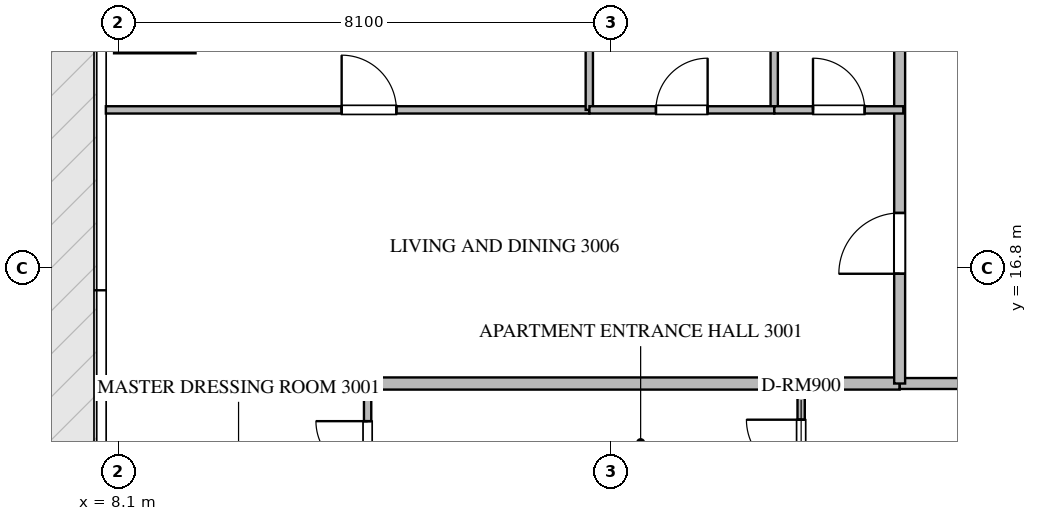
"""IFC4 building model, lengths in metres.
Left out: names, types, materials, properties, quantities, classifications, styles, units other than length and angle.
Written with IfcOpenShell. Run it as: python <this file> out.ifc"""

import sys

from ifc_helpers import new_model, si_unit, direction, frame, frame_2d, origin, place, context, subcontext, project, spatial, rectangle, extrude, source, transform, mapped, element, fill, save


model = new_model("IFC4")
c1 = context("Model", 3, precision=1e-05, world=origin(), true_north=direction((0.0, 1.0)))
c2 = subcontext(c1, "Body", "Model", "MODEL_VIEW")
j1 = project(units=[si_unit("LENGTHUNIT", "METRE"), si_unit("PLANEANGLEUNIT", "RADIAN")], contexts=[c1])
p1 = place(None, origin())
s1 = spatial("IfcSite", under=j1, at=p1, CompositionType="ELEMENT")
p2 = place(p1, origin())
s2 = spatial("IfcBuilding", under=s1, at=p2, CompositionType="ELEMENT")
p3 = place(p2, frame((0.0, 0.0, 123.9)))
s3 = spatial("IfcBuildingStorey", under=s2, at=p3, CompositionType="ELEMENT", Elevation=123.9)
p4 = place(p3, frame((7.882, 14.9, 0.0), z_axis=(0.0, 0.0, 1.0), x_axis=(1.0, 0.0, 0.0)))
e1 = element("IfcWall", 1, at=p4, inside=s3, PredefinedType="PARTITIONING", context=c2, shape_type="SweptSolid", body=[
    extrude(rectangle(XDim=13.068, YDim=0.2, at=frame_2d((6.534, 0.0))), origin(), (0.0, 0.0, 1.0), 3.49),
])
p5 = place(p3, frame((20.952, 14.9, 0.0), z_axis=(0.0, 0.0, 1.0), x_axis=(1.0, 0.0, 0.0)))
e2 = element("IfcWall", 2, at=p5, inside=s3, PredefinedType="PARTITIONING", context=c2, shape_type="SweptSolid", body=[
    extrude(rectangle(XDim=22.896, YDim=0.18, at=frame_2d((11.448, 0.0))), origin(), (0.0, 0.0, 1.0), 3.49),
])
p6 = place(p5, frame((2.781, 0.0, 0.0)))
e3 = element("IfcOpeningElement", 3, at=p6, cuts=e2, PredefinedType="OPENING", context=c2, shape_type="SweptSolid", body=[
    extrude(rectangle(XDim=1.0, YDim=2.15, at=frame_2d((0.5, 1.075))), frame((0.0, 0.1, 0.0), z_axis=(0.0, -1.0, 0.0), x_axis=(1.0, 0.0, 0.0)), (0.0, 0.0, 1.0), 0.2),
])
p7 = place(p5, frame((7.16, 0.0, 0.0)))
e4 = element("IfcOpeningElement", 4, at=p7, cuts=e2, PredefinedType="OPENING", context=c2, shape_type="SweptSolid", body=[
    extrude(rectangle(XDim=1.0, YDim=2.15, at=frame_2d((0.5, 1.075))), frame((0.0, 0.1, 0.0), z_axis=(0.0, -1.0, 0.0), x_axis=(1.0, 0.0, 0.0)), (0.0, 0.0, 1.0), 0.2),
])
p8 = place(p5, frame((19.115, 0.0, 0.0)))
e5 = element("IfcOpeningElement", 5, at=p8, cuts=e2, PredefinedType="OPENING", context=c2, shape_type="SweptSolid", body=[
    extrude(rectangle(XDim=1.0, YDim=2.15, at=frame_2d((0.5, 1.075))), frame((0.0, 0.1, 0.0), z_axis=(0.0, -1.0, 0.0), x_axis=(1.0, 0.0, 0.0)), (0.0, 0.0, 1.0), 0.2),
])
p9 = place(p3, frame((20.95, 14.9, 0.0), z_axis=(0.0, 0.0, 1.0), x_axis=(0.0, 1.0, 0.0)))
e6 = element("IfcWall", 6, at=p9, inside=s3, PredefinedType="PARTITIONING", context=c2, shape_type="SweptSolid", body=[
    extrude(rectangle(XDim=18.7, YDim=0.18, at=frame_2d((9.35, 0.0))), origin(), (0.0, 0.0, 1.0), 3.49),
])
p10 = place(p9, frame((1.805, 0.0, 0.0)))
e7 = element("IfcOpeningElement", 7, at=p10, cuts=e6, PredefinedType="OPENING", context=c2, shape_type="SweptSolid", body=[
    extrude(rectangle(XDim=1.0, YDim=2.15, at=frame_2d((0.5, 1.075))), frame((0.0, 0.1, 0.0), z_axis=(0.0, -1.0, 0.0), x_axis=(1.0, 0.0, 0.0)), (0.0, 0.0, 1.0), 0.2),
])
p11 = place(p9, frame((10.602, 0.0, 0.0)))
e8 = element("IfcOpeningElement", 8, at=p11, cuts=e6, PredefinedType="OPENING", context=c2, shape_type="SweptSolid", body=[
    extrude(rectangle(XDim=1.0, YDim=2.15, at=frame_2d((0.5, 1.075))), frame((0.0, 0.1, 0.0), z_axis=(0.0, -1.0, 0.0), x_axis=(1.0, 0.0, 0.0)), (0.0, 0.0, 1.0), 0.2),
])
p12 = place(p3, frame((19.33, 12.75, 0.0), z_axis=(0.0, 0.0, 1.0), x_axis=(0.0, 1.0, 0.0)))
e9 = element("IfcWall", 9, at=p12, inside=s3, PredefinedType="PARTITIONING", context=c2, shape_type="SweptSolid", body=[
    extrude(rectangle(XDim=2.21, YDim=0.12, at=frame_2d((1.105, 0.0))), origin(), (0.0, 0.0, 1.0), 3.49),
])
p13 = place(p12, frame((0.655, 0.0, 0.0)))
e10 = element("IfcOpeningElement", 10, at=p13, cuts=e9, PredefinedType="OPENING", context=c2, shape_type="SweptSolid", body=[
    extrude(rectangle(XDim=0.9, YDim=2.1, at=frame_2d((0.45, 1.05))), frame((0.0, 0.07, 0.0), z_axis=(0.0, -1.0, 0.0), x_axis=(1.0, 0.0, 0.0)), (0.0, 0.0, 1.0), 0.14),
])
p14 = place(p3, frame((12.2, 12.752, 0.0), z_axis=(0.0, 0.0, 1.0), x_axis=(0.0, 1.0, 0.0)))
e11 = element("IfcWall", 11, at=p14, inside=s3, PredefinedType="PARTITIONING", context=c2, shape_type="SweptSolid", body=[
    extrude(rectangle(XDim=2.208, YDim=0.12, at=frame_2d((1.104, 0.0))), origin(), (0.0, 0.0, 1.0), 3.49),
])
p15 = place(p14, frame((0.679, 0.0, 0.0)))
e12 = element("IfcOpeningElement", 12, at=p15, cuts=e11, PredefinedType="OPENING", context=c2, shape_type="SweptSolid", body=[
    extrude(rectangle(XDim=0.85, YDim=2.1, at=frame_2d((0.425, 1.05))), frame((0.0, 0.07, 0.0), z_axis=(0.0, -1.0, 0.0), x_axis=(1.0, 0.0, 0.0)), (0.0, 0.0, 1.0), 0.14),
])
p16 = place(p3, frame((7.895, 19.4, 0.0), z_axis=(0.0, 0.0, 1.0), x_axis=(1.0, 0.0, 0.0)))
e13 = element("IfcWall", 13, at=p16, inside=s3, PredefinedType="PARTITIONING", context=c2, shape_type="SweptSolid", body=[
    extrude(rectangle(XDim=7.951, YDim=0.12, at=frame_2d((3.976, 0.0))), origin(), (0.0, 0.0, 1.0), 3.49),
])
p17 = place(p16, frame((3.878, 0.0, 0.0)))
e14 = element("IfcOpeningElement", 14, at=p17, cuts=e13, PredefinedType="OPENING", context=c2, shape_type="SweptSolid", body=[
    extrude(rectangle(XDim=0.9, YDim=2.1, at=frame_2d((0.45, 1.05))), frame((0.0, 0.07, 0.0), z_axis=(0.0, -1.0, 0.0), x_axis=(1.0, 0.0, 0.0)), (0.0, 0.0, 1.0), 0.14),
])
for number, where, z_axis, x_axis in (
    (15, (15.846, 19.4, 0.0), (0.0, 0.0, 1.0), (0.0, 1.0, 0.0)),
    (16, (18.887, 19.4, 0.0), (0.0, 0.0, 1.0), (0.0, 1.0, 0.0)),
):
    element("IfcWall", number, at=place(p3, frame(where, z_axis=z_axis, x_axis=x_axis)), inside=s3, PredefinedType="PARTITIONING", context=c2, shape_type="SweptSolid", body=[
        extrude(rectangle(XDim=4.86, YDim=0.12, at=frame_2d((2.43, 0.0))), origin(), (0.0, 0.0, 1.0), 3.49),
    ])
p18 = place(p3, frame((15.848, 19.4, 0.0), z_axis=(0.0, 0.0, 1.0), x_axis=(1.0, 0.0, 0.0)))
e17 = element("IfcWall", 17, at=p18, inside=s3, PredefinedType="PARTITIONING", context=c2, shape_type="SweptSolid", body=[
    extrude(rectangle(XDim=3.039, YDim=0.12, at=frame_2d((1.52, 0.0))), origin(), (0.0, 0.0, 1.0), 3.49),
])
p19 = place(p18, frame((1.094, 0.0, 0.0)))
e18 = element("IfcOpeningElement", 18, at=p19, cuts=e17, PredefinedType="OPENING", context=c2, shape_type="SweptSolid", body=[
    extrude(rectangle(XDim=0.85, YDim=2.1, at=frame_2d((0.425, 1.05))), frame((0.0, 0.07, 0.0), z_axis=(0.0, -1.0, 0.0), x_axis=(1.0, 0.0, 0.0)), (0.0, 0.0, 1.0), 0.14),
])
p20 = place(p3, frame((18.889, 19.4, 0.0), z_axis=(0.0, 0.0, 1.0), x_axis=(1.0, 0.0, 0.0)))
e19 = element("IfcWall", 19, at=p20, inside=s3, PredefinedType="PARTITIONING", context=c2, shape_type="SweptSolid", body=[
    extrude(rectangle(XDim=2.121, YDim=0.12, at=frame_2d((1.061, 0.0))), origin(), (0.0, 0.0, 1.0), 3.49),
])
p21 = place(p20, frame((0.636, 0.0, 0.0)))
e20 = element("IfcOpeningElement", 20, at=p21, cuts=e19, PredefinedType="OPENING", context=c2, shape_type="SweptSolid", body=[
    extrude(rectangle(XDim=0.85, YDim=2.1, at=frame_2d((0.425, 1.05))), frame((0.0, 0.07, 0.0), z_axis=(0.0, -1.0, 0.0), x_axis=(1.0, 0.0, 0.0)), (0.0, 0.0, 1.0), 0.14),
])
m1 = source(origin(), c2, "Body", "SweptSolid", [
    extrude(rectangle(XDim=1.0, YDim=2.15, at=frame_2d((0.5, 1.075))), frame((0.0, 0.025, 0.0), z_axis=(0.0, -1.0, 0.0), x_axis=(1.0, 0.0, 0.0)), (0.0, 0.0, 1.0), 0.05),
])
p22 = place(p10, origin())
e21 = element("IfcDoor", 21, at=p22, inside=s3, OperationType="SINGLE_SWING_LEFT", PredefinedType="DOOR", context=c2, shape_type="MappedRepresentation", body=[
    mapped(m1, transform((0.0, 0.0, 0.0), scale=1.0)),
])
fill(e7, e21)
m2 = source(origin(), c2, "Body", "SweptSolid", [
    extrude(rectangle(XDim=0.9, YDim=2.1, at=frame_2d((0.45, 1.05))), frame((0.0, 0.025, 0.0), z_axis=(0.0, -1.0, 0.0), x_axis=(1.0, 0.0, 0.0)), (0.0, 0.0, 1.0), 0.05),
])
p23 = place(p13, origin())
e22 = element("IfcDoor", 22, at=p23, inside=s3, OperationType="SINGLE_SWING_RIGHT", PredefinedType="DOOR", context=c2, shape_type="MappedRepresentation", body=[
    mapped(m2, transform((0.0, 0.0, 0.0), scale=1.0)),
])
fill(e10, e22)
m3 = source(origin(), c2, "Body", "SweptSolid", [
    extrude(rectangle(XDim=0.85, YDim=2.1, at=frame_2d((0.425, 1.05))), frame((0.0, 0.025, 0.0), z_axis=(0.0, -1.0, 0.0), x_axis=(1.0, 0.0, 0.0)), (0.0, 0.0, 1.0), 0.05),
])
p24 = place(p15, origin())
e23 = element("IfcDoor", 23, at=p24, inside=s3, OperationType="SINGLE_SWING_RIGHT", PredefinedType="DOOR", context=c2, shape_type="MappedRepresentation", body=[
    mapped(m3, transform((0.0, 0.0, 0.0), scale=1.0)),
])
fill(e12, e23)
p25 = place(p17, origin())
e24 = element("IfcDoor", 24, at=p25, inside=s3, OperationType="SINGLE_SWING_LEFT", PredefinedType="DOOR", context=c2, shape_type="MappedRepresentation", body=[
    mapped(m2, transform((0.0, 0.0, 0.0), scale=1.0)),
])
fill(e14, e24)
p26 = place(p19, origin())
e25 = element("IfcDoor", 25, at=p26, inside=s3, OperationType="SINGLE_SWING_RIGHT", PredefinedType="DOOR", context=c2, shape_type="MappedRepresentation", body=[
    mapped(m3, transform((0.0, 0.0, 0.0), scale=1.0)),
])
fill(e18, e25)
p27 = place(p21, origin())
e26 = element("IfcDoor", 26, at=p27, inside=s3, OperationType="SINGLE_SWING_LEFT", PredefinedType="DOOR", context=c2, shape_type="MappedRepresentation", body=[
    mapped(m3, transform((0.0, 0.0, 0.0), scale=1.0)),
])
fill(e20, e26)
save(model, sys.argv[1])
